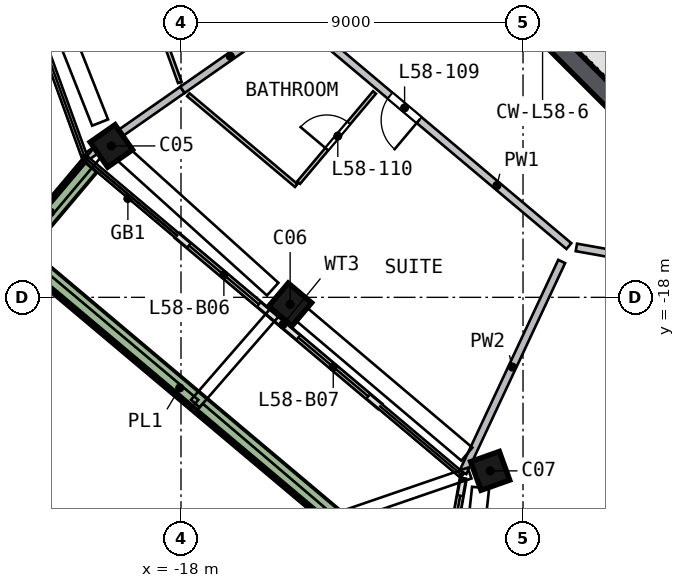
"""IFC4 building model, lengths in metres.
Left out: names, types, materials, properties, quantities, classifications, styles, units other than length and angle.
Written with IfcOpenShell. Run it as: python <this file> out.ifc"""

import sys

from ifc_helpers import new_model, si_unit, direction, frame, frame_2d, origin, origin_2d, place, context, subcontext, project, spatial, rectangle, extrude, element, fill, save


model = new_model("IFC4")
c1 = context("Model", 3, precision=1e-05, world=origin(), true_north=direction((0.0, 1.0)))
c2 = subcontext(c1, "Body", "Model", "MODEL_VIEW")
j1 = project(units=[si_unit("LENGTHUNIT", "METRE"), si_unit("PLANEANGLEUNIT", "RADIAN")], contexts=[c1])
p1 = place(None, origin())
s1 = spatial("IfcSite", under=j1, at=p1, CompositionType="ELEMENT")
p2 = place(p1, origin())
s2 = spatial("IfcBuilding", under=s1, at=p2, CompositionType="ELEMENT")
p3 = place(p2, frame((0.0, 0.0, 237.5)))
s3 = spatial("IfcBuildingStorey", under=s2, at=p3, CompositionType="ELEMENT", Elevation=237.5)
p4 = place(p3, frame((-19.913, -13.902, 0.0), z_axis=(0.066824181, -0.094116423, 0.993315976), x_axis=(-0.568164298, 0.814780281, 0.115422808)))
e1 = element("IfcColumn", 1, at=p4, inside=s3, PredefinedType="COLUMN", context=c2, shape_type="SweptSolid", body=[
    extrude(rectangle(XDim=0.8, YDim=0.8, at=origin_2d()), origin(), (0.0, 0.0, 1.0), 3.211),
])
p5 = place(p3, frame((-15.233, -18.102, 0.0), z_axis=(0.086770351, -0.071788967, 0.99363839), x_axis=(0.760182292, -0.639875796, -0.112613711)))
e2 = element("IfcColumn", 2, at=p5, inside=s3, PredefinedType="COLUMN", context=c2, shape_type="SweptSolid", body=[
    extrude(rectangle(XDim=0.8, YDim=0.8, at=origin_2d()), origin(), (0.0, 0.0, 1.0), 3.21),
])
p6 = place(p3, frame((-9.994, -22.51, 0.0), z_axis=(0.107474763, -0.046592666, 0.993115451), x_axis=(-0.333513819, 0.939330914, 0.08016213)))
e3 = element("IfcColumn", 3, at=p6, inside=s3, PredefinedType="COLUMN", context=c2, shape_type="SweptSolid", body=[
    extrude(rectangle(XDim=0.8, YDim=0.8, at=origin_2d()), origin(), (0.0, 0.0, 1.0), 3.212),
])
p7 = place(p3, frame((-13.823, -5.622, 0.0), z_axis=(0.0, 0.0, 1.0), x_axis=(0.707106781, -0.707106781, 0.0)))
e4 = element("IfcWall", 4, at=p7, inside=s3, PredefinedType="SHEAR", context=c2, shape_type="SweptSolid", body=[
    extrude(rectangle(XDim=11.598, YDim=0.5, at=frame_2d((5.799, 0.0))), origin(), (0.0, 0.0, 1.0), 3.5),
])
p8 = place(p7, frame((2.099, 0.0, 0.0)))
e5 = element("IfcOpeningElement", 5, at=p8, cuts=e4, PredefinedType="OPENING", context=c2, shape_type="SweptSolid", body=[
    extrude(rectangle(XDim=1.2, YDim=2.1, at=frame_2d((0.6, 1.05))), frame((0.0, 0.26, 0.0), z_axis=(0.0, -1.0, 0.0), x_axis=(1.0, 0.0, 0.0)), (0.0, 0.0, 1.0), 0.52),
])
p9 = place(p3, frame((-18.095, -16.379, 0.0), z_axis=(0.0, 0.0, 1.0), x_axis=(0.765168231, -0.643830395, 0.0)))
e6 = element("IfcWall", 6, at=p9, inside=s3, PredefinedType="SOLIDWALL", context=c2, shape_type="SweptSolid", body=[
    extrude(rectangle(XDim=3.3, YDim=0.15, at=frame_2d((1.65, 0.0))), origin(), (0.0, 0.0, 1.0), 2.525),
])
p10 = place(p9, frame((0.4, 0.0, 0.0)))
e7 = element("IfcOpeningElement", 7, at=p10, cuts=e6, PredefinedType="OPENING", context=c2, shape_type="SweptSolid", body=[
    extrude(rectangle(XDim=2.4, YDim=2.4, at=frame_2d((1.2, 1.2))), frame((0.0, 0.085, 0.0), z_axis=(0.0, -1.0, 0.0), x_axis=(1.0, 0.0, 0.0)), (0.0, 0.0, 1.0), 0.17),
])
p11 = place(p3, frame((-15.571, -18.504, 0.0), z_axis=(0.0, 0.0, 1.0), x_axis=(0.765118664, -0.643889299, 0.0)))
e8 = element("IfcWall", 8, at=p11, inside=s3, PredefinedType="SOLIDWALL", context=c2, shape_type="SweptSolid", body=[
    extrude(rectangle(XDim=3.661, YDim=0.15, at=frame_2d((1.831, 0.0))), origin(), (0.0, 0.0, 1.0), 2.525),
])
p12 = place(p11, frame((0.861, 0.0, 0.0)))
e9 = element("IfcOpeningElement", 9, at=p12, cuts=e8, PredefinedType="OPENING", context=c2, shape_type="SweptSolid", body=[
    extrude(rectangle(XDim=2.4, YDim=2.4, at=frame_2d((1.2, 1.2))), frame((0.0, 0.085, 0.0), z_axis=(0.0, -1.0, 0.0), x_axis=(1.0, 0.0, 0.0)), (0.0, 0.0, 1.0), 0.17),
])
p13 = place(p3, frame((-10.584, -22.828, 0.0), z_axis=(0.0, 0.0, 1.0), x_axis=(-0.1750169, -0.984565429, 0.0)))
e10 = element("IfcWall", 10, at=p13, inside=s3, PredefinedType="SOLIDWALL", context=c2, shape_type="SweptSolid", body=[
    extrude(rectangle(XDim=3.2, YDim=0.15, at=frame_2d((1.6, 0.0))), origin(), (0.0, 0.0, 1.0), 2.525),
])
p14 = place(p13, frame((0.4, 0.0, 0.0)))
e11 = element("IfcOpeningElement", 11, at=p14, cuts=e10, PredefinedType="OPENING", context=c2, shape_type="SweptSolid", body=[
    extrude(rectangle(XDim=2.4, YDim=2.4, at=frame_2d((1.2, 1.2))), frame((0.0, 0.085, 0.0), z_axis=(0.0, -1.0, 0.0), x_axis=(1.0, 0.0, 0.0)), (0.0, 0.0, 1.0), 0.17),
])
p15 = place(p3, frame((-20.402, -14.538, 0.0), z_axis=(0.0, 0.0, 1.0), x_axis=(-0.64387015, -0.765134779, 0.0)))
e12 = element("IfcWall", 12, at=p15, inside=s3, PredefinedType="SOLIDWALL", context=c2, shape_type="SweptSolid", body=[
    extrude(rectangle(XDim=3.199, YDim=0.5, at=frame_2d((1.6, 0.0))), origin(), (0.0, 0.0, 1.0), 0.7),
])
p16 = place(p3, frame((-22.109, -16.955, 0.0), z_axis=(0.0, 0.0, 1.0), x_axis=(0.765144719, -0.643858337, 0.0)))
e13 = element("IfcWall", 13, at=p16, inside=s3, PredefinedType="SOLIDWALL", context=c2, shape_type="SweptSolid", body=[
    extrude(rectangle(XDim=10.652, YDim=0.5, at=frame_2d((5.326, 0.0))), origin(), (0.0, 0.0, 1.0), 0.7),
])
p17 = place(p3, frame((-7.793, -16.651, 0.0), z_axis=(0.0, 0.0, 1.0), x_axis=(-0.765159283, 0.643841029, 0.0)))
e14 = element("IfcWall", 14, at=p17, inside=s3, PredefinedType="SOLIDWALL", context=c2, shape_type="SweptSolid", body=[
    extrude(rectangle(XDim=9.517, YDim=0.2, at=frame_2d((4.758, 0.0))), origin(), (0.0, 0.0, 1.0), 3.19),
])
p18 = place(p17, frame((5.15, 0.0, 0.0)))
e15 = element("IfcOpeningElement", 15, at=p18, cuts=e14, PredefinedType="OPENING", context=c2, shape_type="SweptSolid", body=[
    extrude(rectangle(XDim=1.0, YDim=2.1, at=frame_2d((0.5, 1.05))), frame((0.0, 0.11, 0.0), z_axis=(0.0, -1.0, 0.0), x_axis=(1.0, 0.0, 0.0)), (0.0, 0.0, 1.0), 0.22),
])
p19 = place(p3, frame((1.577, -18.317, 0.0), z_axis=(0.0, 0.0, 1.0), x_axis=(-0.984565418, 0.175016965, 0.0)))
e16 = element("IfcWall", 16, at=p19, inside=s3, PredefinedType="SOLIDWALL", context=c2, shape_type="SweptSolid", body=[
    extrude(rectangle(XDim=9.317, YDim=0.2, at=frame_2d((4.658, 0.0))), origin(), (0.0, 0.0, 1.0), 3.19),
])
p20 = place(p19, frame((3.835, 0.0, 0.0)))
e17 = element("IfcOpeningElement", 17, at=p20, cuts=e16, PredefinedType="OPENING", context=c2, shape_type="SweptSolid", body=[
    extrude(rectangle(XDim=1.8, YDim=2.1, at=frame_2d((0.9, 1.05))), frame((0.0, 0.11, 0.0), z_axis=(0.0, -1.0, 0.0), x_axis=(1.0, 0.0, 0.0)), (0.0, 0.0, 1.0), 0.22),
])
p21 = place(p3, frame((-17.961, -12.539, 0.0), z_axis=(0.0, 0.0, 1.0), x_axis=(-0.819962324, -0.572417494, 0.0)))
e18 = element("IfcWall", 18, at=p21, inside=s3, PredefinedType="SOLIDWALL", context=c2, shape_type="SweptSolid", body=[
    extrude(rectangle(XDim=3.059, YDim=0.2, at=frame_2d((1.53, 0.0))), origin(), (0.0, 0.0, 1.0), 3.19),
])
p22 = place(p3, frame((-15.441, -10.78, 0.0), z_axis=(0.0, 0.0, 1.0), x_axis=(-0.819914454, -0.572486059, 0.0)))
e19 = element("IfcWall", 19, at=p22, inside=s3, PredefinedType="SOLIDWALL", context=c2, shape_type="SweptSolid", body=[
    extrude(rectangle(XDim=3.073, YDim=0.2, at=frame_2d((1.536, 0.0))), origin(), (0.0, 0.0, 1.0), 3.19),
])
p23 = place(p3, frame((-10.582, -22.61, 0.0), z_axis=(0.0, 0.0, 1.0), x_axis=(0.423859501, 0.905727952, 0.0)))
e20 = element("IfcWall", 20, at=p23, inside=s3, PredefinedType="SOLIDWALL", context=c2, shape_type="SweptSolid", body=[
    extrude(rectangle(XDim=6.132, YDim=0.2, at=frame_2d((3.066, 0.0))), origin(), (0.0, 0.0, 1.0), 3.19),
])
p24 = place(p3, frame((-19.293, -8.862, 0.0), z_axis=(0.0, 0.0, 1.0), x_axis=(0.340642022, -0.940193072, 0.0)))
e21 = element("IfcWall", 21, at=p24, inside=s3, PredefinedType="PARTITIONING", context=c2, shape_type="SweptSolid", body=[
    extrude(rectangle(XDim=3.704, YDim=0.1, at=frame_2d((1.852, 0.0))), origin(), (0.0, 0.0, 1.0), 3.19),
])
p25 = place(p3, frame((-14.968, -15.057, 0.0), z_axis=(0.0, 0.0, 1.0), x_axis=(-0.765155095, 0.643846007, 0.0)))
e22 = element("IfcWall", 22, at=p25, inside=s3, PredefinedType="PARTITIONING", context=c2, shape_type="SweptSolid", body=[
    extrude(rectangle(XDim=3.711, YDim=0.1, at=frame_2d((1.855, 0.0))), origin(), (0.0, 0.0, 1.0), 3.19),
])
p26 = place(p3, frame((-14.904, -14.981, 0.0), z_axis=(0.0, 0.0, 1.0), x_axis=(0.643817992, 0.765178668, 0.0)))
e23 = element("IfcWall", 23, at=p26, inside=s3, PredefinedType="PARTITIONING", context=c2, shape_type="SweptSolid", body=[
    extrude(rectangle(XDim=3.1, YDim=0.1, at=frame_2d((1.55, 0.0))), origin(), (0.0, 0.0, 1.0), 3.19),
])
p27 = place(p26, frame((1.15, 0.0, 0.0)))
e24 = element("IfcOpeningElement", 24, at=p27, cuts=e23, PredefinedType="OPENING", context=c2, shape_type="SweptSolid", body=[
    extrude(rectangle(XDim=0.9, YDim=2.1, at=frame_2d((0.45, 1.05))), frame((0.0, 0.06, 0.0), z_axis=(0.0, -1.0, 0.0), x_axis=(1.0, 0.0, 0.0)), (0.0, 0.0, 1.0), 0.12),
])
p28 = place(p10, origin())
e25 = element("IfcDoor", 25, at=p28, inside=s3, OperationType="SLIDING_TO_RIGHT", PredefinedType="DOOR", context=c2, shape_type="SweptSolid", body=[
    extrude(rectangle(XDim=2.4, YDim=2.4, at=frame_2d((1.2, 1.2))), frame((0.0, 0.025, 0.0), z_axis=(0.0, -1.0, 0.0), x_axis=(1.0, 0.0, 0.0)), (0.0, 0.0, 1.0), 0.05),
])
fill(e7, e25)
p29 = place(p12, origin())
e26 = element("IfcDoor", 26, at=p29, inside=s3, OperationType="SLIDING_TO_LEFT", PredefinedType="DOOR", context=c2, shape_type="SweptSolid", body=[
    extrude(rectangle(XDim=2.4, YDim=2.4, at=frame_2d((1.2, 1.2))), frame((0.0, 0.025, 0.0), z_axis=(0.0, -1.0, 0.0), x_axis=(1.0, 0.0, 0.0)), (0.0, 0.0, 1.0), 0.05),
])
fill(e9, e26)
p30 = place(p14, origin())
e27 = element("IfcDoor", 27, at=p30, inside=s3, OperationType="SLIDING_TO_LEFT", PredefinedType="DOOR", context=c2, shape_type="SweptSolid", body=[
    extrude(rectangle(XDim=2.4, YDim=2.4, at=frame_2d((1.2, 1.2))), frame((0.0, 0.025, 0.0), z_axis=(0.0, -1.0, 0.0), x_axis=(1.0, 0.0, 0.0)), (0.0, 0.0, 1.0), 0.05),
])
fill(e11, e27)
p31 = place(p18, origin())
e28 = element("IfcDoor", 28, at=p31, inside=s3, OperationType="SINGLE_SWING_LEFT", PredefinedType="DOOR", context=c2, shape_type="SweptSolid", body=[
    extrude(rectangle(XDim=1.0, YDim=2.1, at=frame_2d((0.5, 1.05))), frame((0.0, 0.025, 0.0), z_axis=(0.0, -1.0, 0.0), x_axis=(1.0, 0.0, 0.0)), (0.0, 0.0, 1.0), 0.05),
])
fill(e15, e28)
p32 = place(p27, origin())
e29 = element("IfcDoor", 29, at=p32, inside=s3, OperationType="SINGLE_SWING_LEFT", PredefinedType="DOOR", context=c2, shape_type="SweptSolid", body=[
    extrude(rectangle(XDim=0.9, YDim=2.1, at=frame_2d((0.45, 1.05))), frame((0.0, 0.025, 0.0), z_axis=(0.0, -1.0, 0.0), x_axis=(1.0, 0.0, 0.0)), (0.0, 0.0, 1.0), 0.05),
])
fill(e24, e29)
save(model, sys.argv[1])
